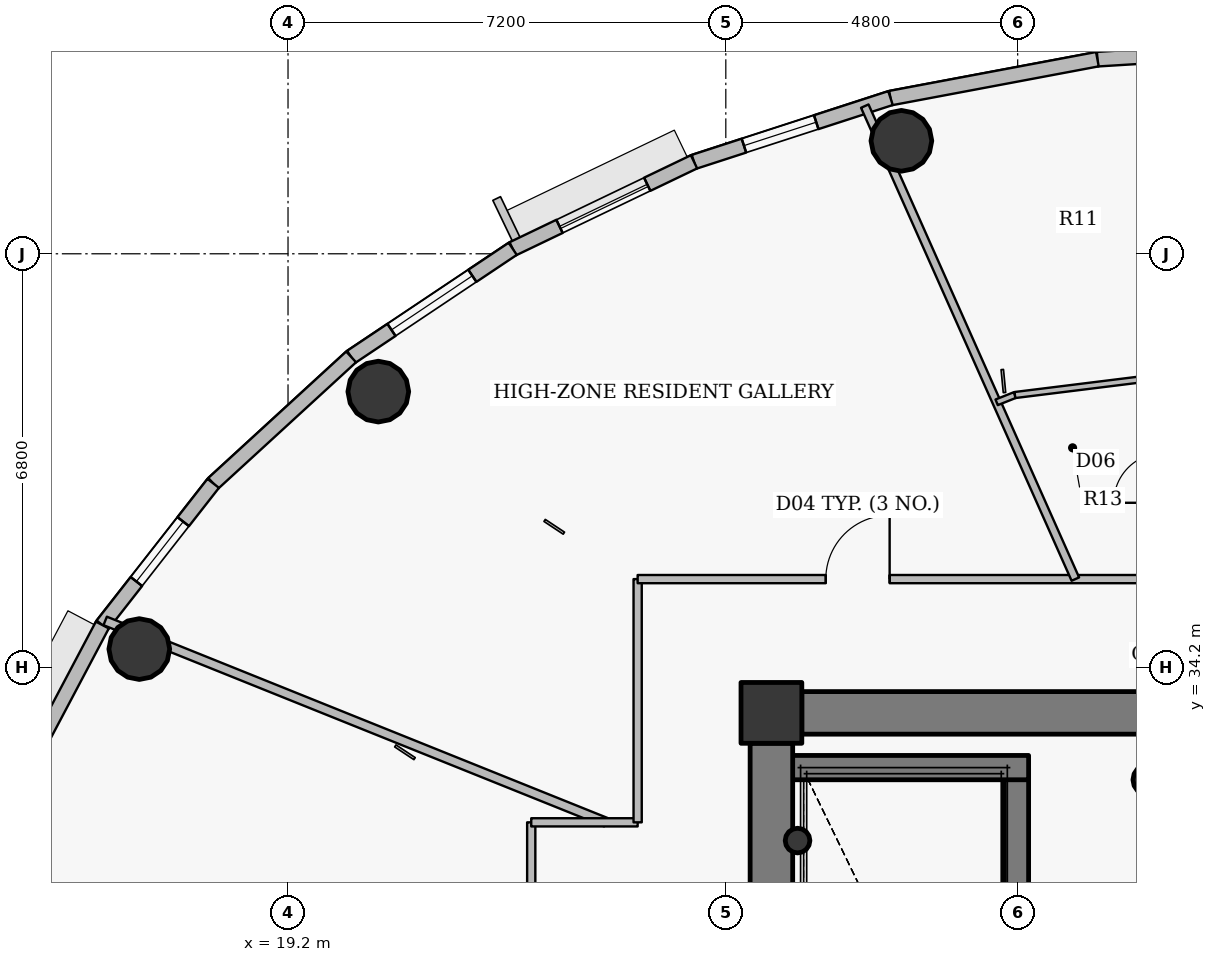
"""IFC4 building model, lengths in metres.
Left out: names, types, materials, properties, quantities, classifications, styles, units other than length and angle.
Written with IfcOpenShell. Run it as: python <this file> out.ifc"""

import sys

from ifc_helpers import new_model, si_unit, direction, frame, frame_2d, origin, origin_2d, place, context, subcontext, project, spatial, rectangle, hollow_circle, extrude, source, transform, mapped, element, fill, save


model = new_model("IFC4")
c1 = context("Model", 3, precision=1e-05, world=origin(), true_north=direction((0.0, 1.0)))
c2 = subcontext(c1, "Body", "Model", "MODEL_VIEW")
j1 = project(units=[si_unit("LENGTHUNIT", "METRE"), si_unit("PLANEANGLEUNIT", "RADIAN")], contexts=[c1])
p1 = place(None, origin())
s1 = spatial("IfcSite", under=j1, at=p1, CompositionType="ELEMENT")
p2 = place(p1, origin())
s2 = spatial("IfcBuilding", under=s1, at=p2, CompositionType="ELEMENT")
p3 = place(p2, frame((0.0, 0.0, 310.5)))
s3 = spatial("IfcBuildingStorey", under=s2, at=p3, CompositionType="ELEMENT", Elevation=310.5)
p4 = place(p3, frame((27.15, 33.45, 0.0), z_axis=(0.0, 0.0, 1.0), x_axis=(1.0, 0.0, 0.0)))
e1 = element("IfcColumn", 1, at=p4, inside=s3, PredefinedType="COLUMN", context=c2, shape_type="SweptSolid", body=[
    extrude(rectangle(XDim=1.0, YDim=1.0, at=origin_2d()), origin(), (0.0, 0.0, 1.0), 3.75),
])
p5 = place(p3, frame((33.35, 32.35, 0.0), z_axis=(0.0, 0.0, 1.0), x_axis=(1.0, 0.0, 0.0)))
e2 = element("IfcColumn", 2, at=p5, inside=s3, PredefinedType="COLUMN", context=c2, shape_type="SweptSolid", body=[
    extrude(hollow_circle(Radius=0.254, WallThickness=0.02, at=origin_2d()), origin(), (0.0, 0.0, 1.0), 3.75),
])
p6 = place(p3, frame((31.18, 27.8, 0.0), z_axis=(0.0, 0.0, 1.0), x_axis=(0.0, 1.0, 0.0)))
e3 = element("IfcWall", 3, at=p6, inside=s3, PredefinedType="SHEAR", context=c2, shape_type="SweptSolid", body=[
    extrude(rectangle(XDim=4.75, YDim=0.4, at=frame_2d((2.375, 0.0))), origin(), (0.0, 0.0, 1.0), 3.75),
])
p7 = place(p3, frame((27.25, 32.55, 0.0), z_axis=(0.0, 0.0, 1.0), x_axis=(1.0, 0.0, 0.0)))
e4 = element("IfcWall", 4, at=p7, inside=s3, PredefinedType="SHEAR", context=c2, shape_type="SweptSolid", body=[
    extrude(rectangle(XDim=4.13, YDim=0.4, at=frame_2d((2.065, 0.0))), origin(), (0.0, 0.0, 1.0), 3.75),
])
p8 = place(p3, frame((27.58, 31.35, 0.0), z_axis=(0.0, 0.0, 1.0), x_axis=(1.0, 0.0, 0.0)))
e5 = element("IfcColumn", 5, at=p8, inside=s3, PredefinedType="COLUMN", context=c2, shape_type="SweptSolid", body=[
    extrude(hollow_circle(Radius=0.203, WallThickness=0.016, at=origin_2d()), origin(), (0.0, 0.0, 1.0), 3.75),
])
p9 = place(p3, frame((27.65, 33.45, 0.0), z_axis=(0.0, 0.0, 1.0), x_axis=(1.0, 0.0, 0.0)))
e6 = element("IfcWall", 6, at=p9, inside=s3, PredefinedType="SHEAR", context=c2, shape_type="SweptSolid", body=[
    extrude(rectangle(XDim=16.7, YDim=0.7, at=frame_2d((8.35, 0.0))), origin(), (0.0, 0.0, 1.0), 3.05),
])
p10 = place(p9, frame((12.775, 0.0, 0.0)))
e7 = element("IfcOpeningElement", 7, at=p10, cuts=e6, PredefinedType="OPENING", context=c2, shape_type="SweptSolid", body=[
    extrude(rectangle(XDim=1.15, YDim=2.15, at=origin_2d()), frame((0.575, 0.36, 1.075), z_axis=(0.0, -1.0, 0.0), x_axis=(1.0, 0.0, 0.0)), (0.0, 0.0, 1.0), 0.72),
])
p11 = place(p3, frame((27.15, 21.05, 0.0), z_axis=(0.0, 0.0, 1.0), x_axis=(0.0, 1.0, 0.0)))
e8 = element("IfcWall", 8, at=p11, inside=s3, PredefinedType="SHEAR", context=c2, shape_type="SweptSolid", body=[
    extrude(rectangle(XDim=11.9, YDim=0.7, at=frame_2d((5.95, 0.0))), origin(), (0.0, 0.0, 1.0), 3.05),
])
for number, where, z_axis, x_axis in (
    (9, (29.288, 42.858, 0.0), (0.0, 0.0, 1.0), (1.0, 0.0, 0.0)),
    (10, (20.685, 38.733, 0.0), (0.0, 0.0, 1.0), (1.0, 0.0, 0.0)),
    (11, (16.754, 34.5, 0.0), (0.0, 0.0, 1.0), (1.0, 0.0, 0.0)),
):
    element("IfcColumn", number, at=place(p3, frame(where, z_axis=z_axis, x_axis=x_axis)), inside=s3, PredefinedType="COLUMN", context=c2, shape_type="SweptSolid", body=[
        extrude(hollow_circle(Radius=0.5, WallThickness=0.032, at=origin_2d()), origin(), (0.0, 0.0, 1.0), 3.75),
    ])
p12 = place(p3, frame((32.511, 44.2, 0.0), z_axis=(0.0, 0.0, 1.0), x_axis=(0.998104946479, 0.061534671648, 0.0)))
e12 = element("IfcWall", 12, at=p12, inside=s3, PredefinedType="SOLIDWALL", context=c2, shape_type="SweptSolid", body=[
    extrude(rectangle(XDim=3.495, YDim=0.24, at=frame_2d((1.748, 0.0))), origin(), (0.0, 0.0, 1.0), 3.5),
])
p13 = place(p12, frame((1.123, 0.0, 0.9)))
e13 = element("IfcOpeningElement", 13, at=p13, cuts=e12, PredefinedType="OPENING", context=c2, shape_type="SweptSolid", body=[
    extrude(rectangle(XDim=1.25, YDim=1.65, at=origin_2d()), frame((0.625, 0.13, 0.825), z_axis=(0.0, -1.0, 0.0), x_axis=(1.0, 0.0, 0.0)), (0.0, 0.0, 1.0), 0.26),
])
p14 = place(p3, frame((29.109, 43.56, 0.0), z_axis=(0.0, 0.0, 1.0), x_axis=(0.982782655757, 0.184765395959, 0.0)))
e14 = element("IfcWall", 14, at=p14, inside=s3, PredefinedType="SOLIDWALL", context=c2, shape_type="SweptSolid", body=[
    extrude(rectangle(XDim=3.462, YDim=0.24, at=frame_2d((1.731, 0.0))), origin(), (0.0, 0.0, 1.0), 3.5),
])
p15 = place(p3, frame((25.877, 42.512, 0.0), z_axis=(0.0, 0.0, 1.0), x_axis=(0.95123136723, 0.308478339592, 0.0)))
e15 = element("IfcWall", 15, at=p15, inside=s3, PredefinedType="SOLIDWALL", context=c2, shape_type="SweptSolid", body=[
    extrude(rectangle(XDim=3.398, YDim=0.24, at=frame_2d((1.699, 0.0))), origin(), (0.0, 0.0, 1.0), 3.5),
])
p16 = place(p15, frame((0.863, 0.0, 0.9)))
e16 = element("IfcOpeningElement", 16, at=p16, cuts=e15, PredefinedType="OPENING", context=c2, shape_type="SweptSolid", body=[
    extrude(rectangle(XDim=1.25, YDim=1.65, at=origin_2d()), frame((0.625, 0.13, 0.825), z_axis=(0.0, -1.0, 0.0), x_axis=(1.0, 0.0, 0.0)), (0.0, 0.0, 1.0), 0.26),
])
p17 = place(p3, frame((22.896, 41.082, 0.0), z_axis=(0.0, 0.0, 1.0), x_axis=(0.901573741254, 0.43262546051, 0.0)))
e17 = element("IfcWall", 17, at=p17, inside=s3, PredefinedType="SOLIDWALL", context=c2, shape_type="SweptSolid", body=[
    extrude(rectangle(XDim=3.307, YDim=0.24, at=frame_2d((1.653, 0.0))), origin(), (0.0, 0.0, 1.0), 3.5),
])
p18 = place(p17, frame((0.854, 0.0, 0.9)))
e18 = element("IfcOpeningElement", 18, at=p18, cuts=e17, PredefinedType="OPENING", context=c2, shape_type="SweptSolid", body=[
    extrude(rectangle(XDim=1.6, YDim=1.75, at=origin_2d()), frame((0.8, 0.13, 0.875), z_axis=(0.0, -1.0, 0.0), x_axis=(1.0, 0.0, 0.0)), (0.0, 0.0, 1.0), 0.26),
])
p19 = place(p3, frame((20.238, 39.304, 0.0), z_axis=(0.0, 0.0, 1.0), x_axis=(0.831250592635, 0.55589787933, 0.0)))
e19 = element("IfcWall", 19, at=p19, inside=s3, PredefinedType="SOLIDWALL", context=c2, shape_type="SweptSolid", body=[
    extrude(rectangle(XDim=3.197, YDim=0.24, at=frame_2d((1.599, 0.0))), origin(), (0.0, 0.0, 1.0), 3.5),
])
p20 = place(p19, frame((0.799, 0.0, 0.9)))
e20 = element("IfcOpeningElement", 20, at=p20, cuts=e19, PredefinedType="OPENING", context=c2, shape_type="SweptSolid", body=[
    extrude(rectangle(XDim=1.6, YDim=1.75, at=origin_2d()), frame((0.8, 0.13, 0.875), z_axis=(0.0, -1.0, 0.0), x_axis=(1.0, 0.0, 0.0)), (0.0, 0.0, 1.0), 0.26),
])
p21 = place(p3, frame((17.97, 37.225, 0.0), z_axis=(0.0, 0.0, 1.0), x_axis=(0.737068506972, 0.675818034703, 0.0)))
e21 = element("IfcWall", 21, at=p21, inside=s3, PredefinedType="SOLIDWALL", context=c2, shape_type="SweptSolid", body=[
    extrude(rectangle(XDim=3.077, YDim=0.24, at=frame_2d((1.539, 0.0))), origin(), (0.0, 0.0, 1.0), 3.5),
])
p22 = place(p3, frame((16.146, 34.895, 0.0), z_axis=(0.0, 0.0, 1.0), x_axis=(0.616337186556, 0.787482363275, 0.0)))
e22 = element("IfcWall", 22, at=p22, inside=s3, PredefinedType="SOLIDWALL", context=c2, shape_type="SweptSolid", body=[
    extrude(rectangle(XDim=2.958, YDim=0.24, at=frame_2d((1.479, 0.0))), origin(), (0.0, 0.0, 1.0), 3.5),
])
p23 = place(p22, frame((0.909, 0.0, 0.9)))
e23 = element("IfcOpeningElement", 23, at=p23, cuts=e22, PredefinedType="OPENING", context=c2, shape_type="SweptSolid", body=[
    extrude(rectangle(XDim=1.25, YDim=1.65, at=origin_2d()), frame((0.625, 0.13, 0.825), z_axis=(0.0, -1.0, 0.0), x_axis=(1.0, 0.0, 0.0)), (0.0, 0.0, 1.0), 0.26),
])
p24 = place(p3, frame((14.812, 32.372, 0.0), z_axis=(0.0, 0.0, 1.0), x_axis=(0.467628269026, 0.883925224218, 0.0)))
e24 = element("IfcWall", 24, at=p24, inside=s3, PredefinedType="SOLIDWALL", context=c2, shape_type="SweptSolid", body=[
    extrude(rectangle(XDim=2.854, YDim=0.24, at=frame_2d((1.427, 0.0))), origin(), (0.0, 0.0, 1.0), 3.5),
])
p25 = place(p3, frame((16.193, 34.962, 0.0), z_axis=(0.0, 0.0, 1.0), x_axis=(0.927839710722, -0.372979183343, 0.0)))
e25 = element("IfcWall", 25, at=p25, inside=s3, PredefinedType="PARTITIONING", context=c2, shape_type="SweptSolid", body=[
    extrude(rectangle(XDim=8.874, YDim=0.15, at=frame_2d((4.437, 0.0))), origin(), (0.0, 0.0, 1.0), 3.035),
])
p26 = place(p3, frame((23.2, 29.8, 0.0), z_axis=(0.0, 0.0, 1.0), x_axis=(0.0, 1.0, 0.0)))
e26 = element("IfcWall", 26, at=p26, inside=s3, PredefinedType="PARTITIONING", context=c2, shape_type="SweptSolid", body=[
    extrude(rectangle(XDim=1.85, YDim=0.135, at=frame_2d((0.925, 0.0))), origin(), (0.0, 0.0, 1.0), 3.5),
])
p27 = place(p3, frame((23.2, 31.65, 0.0), z_axis=(0.0, 0.0, 1.0), x_axis=(1.0, 0.0, 0.0)))
e27 = element("IfcWall", 27, at=p27, inside=s3, PredefinedType="PARTITIONING", context=c2, shape_type="SweptSolid", body=[
    extrude(rectangle(XDim=1.75, YDim=0.135, at=frame_2d((0.875, 0.0))), origin(), (0.0, 0.0, 1.0), 3.035),
])
p28 = place(p3, frame((24.95, 31.65, 0.0), z_axis=(0.0, 0.0, 1.0), x_axis=(0.0, 1.0, 0.0)))
e28 = element("IfcWall", 28, at=p28, inside=s3, PredefinedType="PARTITIONING", context=c2, shape_type="SweptSolid", body=[
    extrude(rectangle(XDim=4.0, YDim=0.135, at=frame_2d((2.0, 0.0))), origin(), (0.0, 0.0, 1.0), 3.035),
])
p29 = place(p3, frame((24.95, 35.65, 0.0), z_axis=(0.0, 0.0, 1.0), x_axis=(1.0, 0.0, 0.0)))
e29 = element("IfcWall", 29, at=p29, inside=s3, PredefinedType="PARTITIONING", context=c2, shape_type="SweptSolid", body=[
    extrude(rectangle(XDim=10.1, YDim=0.135, at=frame_2d((5.05, 0.0))), origin(), (0.0, 0.0, 1.0), 3.035),
])
p30 = place(p29, frame((3.094, 0.0, 0.0)))
e30 = element("IfcOpeningElement", 30, at=p30, cuts=e29, PredefinedType="OPENING", context=c2, shape_type="SweptSolid", body=[
    extrude(rectangle(XDim=1.05, YDim=2.15, at=origin_2d()), frame((0.525, 0.078, 1.075), z_axis=(0.0, -1.0, 0.0), x_axis=(1.0, 0.0, 0.0)), (0.0, 0.0, 1.0), 0.155),
])
p31 = place(p3, frame((28.686, 43.428, 0.0), z_axis=(0.0, 0.0, 1.0), x_axis=(0.406736980157, -0.913545307564, 0.0)))
e31 = element("IfcWall", 31, at=p31, inside=s3, PredefinedType="PARTITIONING", context=c2, shape_type="SweptSolid", body=[
    extrude(rectangle(XDim=8.514, YDim=0.135, at=frame_2d((4.257, 0.0))), origin(), (0.0, 0.0, 1.0), 3.035),
])
p32 = place(p3, frame((30.854, 38.557, 0.0), z_axis=(0.0, 0.0, 1.0), x_axis=(0.928996661722, 0.370088101011, 0.0)))
e32 = element("IfcWall", 32, at=p32, inside=s3, PredefinedType="PARTITIONING", context=c2, shape_type="SweptSolid", body=[
    extrude(rectangle(XDim=0.323, YDim=0.1, at=frame_2d((0.162, 0.0))), origin(), (0.0, 0.0, 1.0), 3.035),
])
p33 = place(p3, frame((31.155, 38.677, 0.0), z_axis=(0.0, 0.0, 1.0), x_axis=(0.99239360053, 0.123105408601, 0.0)))
e33 = element("IfcWall", 33, at=p33, inside=s3, PredefinedType="PARTITIONING", context=c2, shape_type="SweptSolid", body=[
    extrude(rectangle(XDim=4.883, YDim=0.1, at=frame_2d((2.441, 0.0))), origin(), (0.0, 0.0, 1.0), 3.035),
])
p34 = place(p33, frame((3.203, 0.0, 0.0)))
e34 = element("IfcOpeningElement", 34, at=p34, cuts=e33, PredefinedType="OPENING", context=c2, shape_type="SweptSolid", body=[
    extrude(rectangle(XDim=0.9, YDim=2.1, at=origin_2d()), frame((0.45, 0.06, 1.05), z_axis=(0.0, -1.0, 0.0), x_axis=(1.0, 0.0, 0.0)), (0.0, 0.0, 1.0), 0.12),
])
p35 = place(p3, frame((27.64, 33.8, 0.0), z_axis=(0.0, 0.0, 1.0), x_axis=(-1.0, 0.0, 0.0)))
e35 = element("IfcWall", 35, at=p35, inside=s3, PredefinedType="PARTITIONING", context=c2, shape_type="SweptSolid", body=[
    extrude(rectangle(XDim=0.84, YDim=0.135, at=frame_2d((0.42, 0.0))), origin(), (0.0, 0.0, 1.0), 3.035),
])
p36 = place(p3, frame((26.8, 33.492, 0.0), z_axis=(0.0, 0.0, 1.0), x_axis=(0.0, -1.0, 0.0)))
e36 = element("IfcWall", 36, at=p36, inside=s3, PredefinedType="PARTITIONING", context=c2, shape_type="SweptSolid", body=[
    extrude(rectangle(XDim=0.532, YDim=0.135, at=frame_2d((0.266, 0.0))), origin(), (0.0, 0.0, 1.0), 3.5),
])
m1 = source(origin(), c2, "Body", "SweptSolid", [
    extrude(rectangle(XDim=1.25, YDim=1.65, at=origin_2d()), frame((0.625, 0.03, 0.825), z_axis=(0.0, -1.0, 0.0), x_axis=(1.0, 0.0, 0.0)), (0.0, 0.0, 1.0), 0.06),
])
p37 = place(p16, origin())
e37 = element("IfcWindow", 37, at=p37, inside=s3, PartitioningType="SINGLE_PANEL", PredefinedType="WINDOW", context=c2, shape_type="MappedRepresentation", body=[
    mapped(m1, transform((0.0, 0.0, 0.0), x_axis=(1.0, 0.0, 0.0), y_axis=(0.0, 1.0, 0.0), z_axis=(0.0, 0.0, 1.0), scale=1.0)),
])
fill(e16, e37)
m2 = source(origin(), c2, "Body", "SweptSolid", [
    extrude(rectangle(XDim=1.6, YDim=1.75, at=origin_2d()), frame((0.8, 0.03, 0.875), z_axis=(0.0, -1.0, 0.0), x_axis=(1.0, 0.0, 0.0)), (0.0, 0.0, 1.0), 0.06),
])
p38 = place(p18, origin())
e38 = element("IfcWindow", 38, at=p38, inside=s3, PartitioningType="DOUBLE_PANEL_VERTICAL", PredefinedType="WINDOW", context=c2, shape_type="MappedRepresentation", body=[
    mapped(m2, transform((0.0, 0.0, 0.0), x_axis=(1.0, 0.0, 0.0), y_axis=(0.0, 1.0, 0.0), z_axis=(0.0, 0.0, 1.0), scale=1.0)),
])
fill(e18, e38)
p39 = place(p20, origin())
e39 = element("IfcWindow", 39, at=p39, inside=s3, PartitioningType="DOUBLE_PANEL_VERTICAL", PredefinedType="WINDOW", context=c2, shape_type="MappedRepresentation", body=[
    mapped(m2, transform((0.0, 0.0, 0.0), x_axis=(1.0, 0.0, 0.0), y_axis=(0.0, 1.0, 0.0), z_axis=(0.0, 0.0, 1.0), scale=1.0)),
])
fill(e20, e39)
p40 = place(p23, origin())
e40 = element("IfcWindow", 40, at=p40, inside=s3, PartitioningType="SINGLE_PANEL", PredefinedType="WINDOW", context=c2, shape_type="MappedRepresentation", body=[
    mapped(m1, transform((0.0, 0.0, 0.0), x_axis=(1.0, 0.0, 0.0), y_axis=(0.0, 1.0, 0.0), z_axis=(0.0, 0.0, 1.0), scale=1.0)),
])
fill(e23, e40)
m3 = source(origin(), c2, "Body", "SweptSolid", [
    extrude(rectangle(XDim=1.05, YDim=2.15, at=origin_2d()), frame((0.525, 0.025, 1.075), z_axis=(0.0, -1.0, 0.0), x_axis=(1.0, 0.0, 0.0)), (0.0, 0.0, 1.0), 0.05),
])
p41 = place(p30, origin())
e41 = element("IfcDoor", 41, at=p41, inside=s3, OperationType="SINGLE_SWING_RIGHT", PredefinedType="DOOR", context=c2, shape_type="MappedRepresentation", body=[
    mapped(m3, transform((0.0, 0.0, 0.0), x_axis=(1.0, 0.0, 0.0), y_axis=(0.0, 1.0, 0.0), z_axis=(0.0, 0.0, 1.0), scale=1.0)),
])
fill(e30, e41)
save(model, sys.argv[1])
